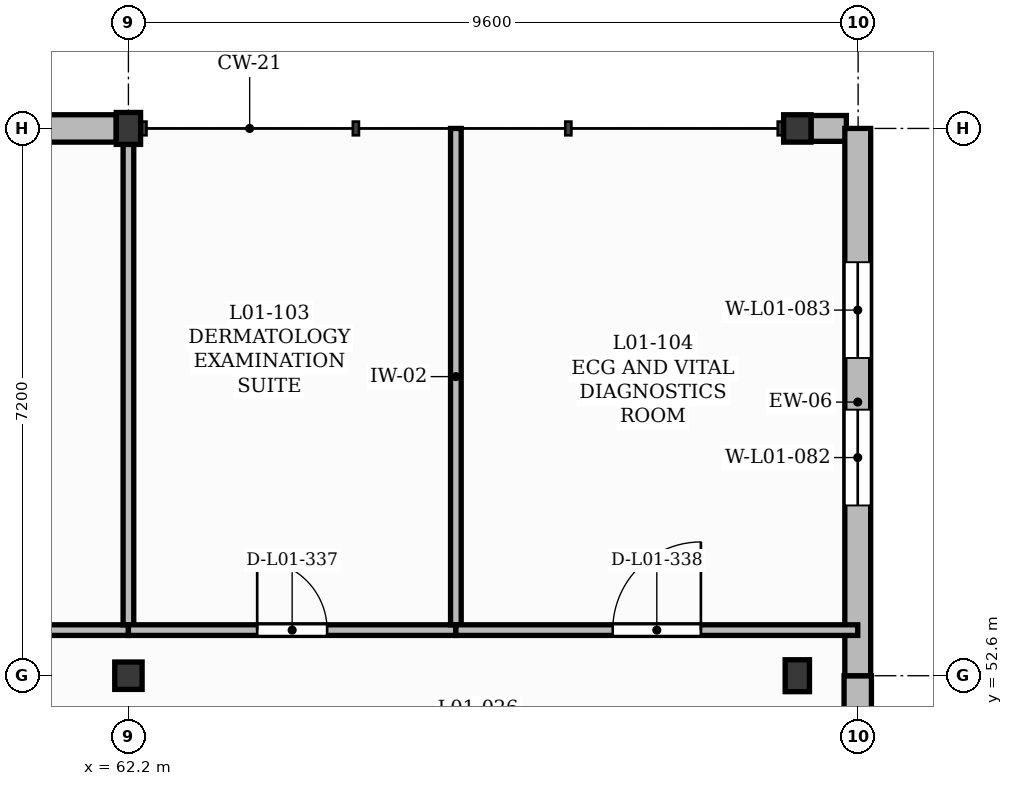
"""IFC4 building model, lengths in metres.
Left out: names, types, materials, properties, quantities, classifications, styles, units other than length and angle.
Written with IfcOpenShell. Run it as: python <this file> out.ifc"""

import sys

from ifc_helpers import new_model, si_unit, direction, frame, frame_2d, origin, origin_2d, place, context, subcontext, project, spatial, rectangle, extrude, element, fill, save


model = new_model("IFC4")
c1 = context("Model", 3, precision=1e-05, world=origin(), true_north=direction((0.0, 1.0)))
c2 = subcontext(c1, "Body", "Model", "MODEL_VIEW")
j1 = project(units=[si_unit("LENGTHUNIT", "METRE"), si_unit("PLANEANGLEUNIT", "RADIAN")], contexts=[c1])
p1 = place(None, origin())
s1 = spatial("IfcSite", under=j1, at=p1, CompositionType="ELEMENT")
p2 = place(p1, origin())
s2 = spatial("IfcBuilding", under=s1, at=p2, CompositionType="ELEMENT")
p3 = place(p2, frame((0.0, 0.0, 4.5)))
s3 = spatial("IfcBuildingStorey", under=s2, at=p3, CompositionType="ELEMENT", Elevation=4.5)
p4 = place(p3, frame((62.2, 52.6, 0.0), z_axis=(0.0, 0.0, 1.0), x_axis=(1.0, 0.0, 0.0)))
e1 = element("IfcColumn", 1, at=p4, inside=s3, PredefinedType="COLUMN", context=c2, shape_type="SweptSolid", body=[
    extrude(rectangle(XDim=0.36, YDim=0.36, at=origin_2d()), origin(), (0.0, 0.0, 1.0), 4.26),
])
for number, where, z_axis, x_axis in (
    (2, (62.2, 59.8, 0.0), (0.0, 0.0, 1.0), (1.0, 0.0, 0.0)),
    (3, (71.0, 52.6, 0.0), (0.0, 0.0, 1.0), (1.0, 0.0, 0.0)),
):
    element("IfcColumn", number, at=place(p3, frame(where, z_axis=z_axis, x_axis=x_axis)), inside=s3, PredefinedType="COLUMN", context=c2, shape_type="SweptSolid", body=[
        extrude(rectangle(XDim=0.32, YDim=0.42, at=origin_2d()), origin(), (0.0, 0.0, 1.0), 4.26),
    ])
p5 = place(p3, frame((71.0, 59.8, 0.0), z_axis=(0.0, 0.0, 1.0), x_axis=(1.0, 0.0, 0.0)))
e4 = element("IfcColumn", 4, at=p5, inside=s3, PredefinedType="COLUMN", context=c2, shape_type="SweptSolid", body=[
    extrude(rectangle(XDim=0.36, YDim=0.36, at=origin_2d()), origin(), (0.0, 0.0, 1.0), 4.26),
])
p6 = place(p3, frame((58.72, 59.8, 0.0), z_axis=(0.0, 0.0, 1.0), x_axis=(1.0, 0.0, 0.0)))
e5 = element("IfcWall", 5, at=p6, inside=s3, PredefinedType="SOLIDWALL", context=c2, shape_type="SweptSolid", body=[
    extrude(rectangle(XDim=3.32, YDim=0.36, at=frame_2d((1.66, 0.0))), origin(), (0.0, 0.0, 1.0), 3.8),
])
p7 = place(p6, frame((1.03, 0.0, 1.05)))
e6 = element("IfcOpeningElement", 6, at=p7, cuts=e5, PredefinedType="OPENING", context=c2, shape_type="SweptSolid", body=[
    extrude(rectangle(XDim=1.26, YDim=1.65, at=frame_2d((0.63, 0.825))), frame((0.0, 0.19, 0.0), z_axis=(0.0, -1.0, 0.0), x_axis=(1.0, 0.0, 0.0)), (0.0, 0.0, 1.0), 0.38),
])
p8 = place(p3, frame((71.795, 45.4, 0.0), z_axis=(0.0, 0.0, 1.0), x_axis=(0.0, 1.0, 0.0)))
e7 = element("IfcWall", 7, at=p8, inside=s3, PredefinedType="SOLIDWALL", context=c2, shape_type="SweptSolid", body=[
    extrude(rectangle(XDim=7.2, YDim=0.36, at=frame_2d((3.6, 0.0))), origin(), (0.0, 0.0, 1.0), 4.26),
])
p9 = place(p8, frame((0.98, 0.0, 1.0)))
e8 = element("IfcOpeningElement", 8, at=p9, cuts=e7, PredefinedType="OPENING", context=c2, shape_type="SweptSolid", body=[
    extrude(rectangle(XDim=1.34, YDim=1.95, at=frame_2d((0.67, 0.975))), frame((0.0, 0.19, 0.0), z_axis=(0.0, -1.0, 0.0), x_axis=(1.0, 0.0, 0.0)), (0.0, 0.0, 1.0), 0.38),
])
p10 = place(p8, frame((3.0, 0.0, 1.0)))
e9 = element("IfcOpeningElement", 9, at=p10, cuts=e7, PredefinedType="OPENING", context=c2, shape_type="SweptSolid", body=[
    extrude(rectangle(XDim=1.34, YDim=1.95, at=frame_2d((0.67, 0.975))), frame((0.0, 0.19, 0.0), z_axis=(0.0, -1.0, 0.0), x_axis=(1.0, 0.0, 0.0)), (0.0, 0.0, 1.0), 0.38),
])
p11 = place(p3, frame((71.18, 59.8, 0.0), z_axis=(0.0, 0.0, 1.0), x_axis=(1.0, 0.0, 0.0)))
e10 = element("IfcWall", 10, at=p11, inside=s3, PredefinedType="SOLIDWALL", context=c2, shape_type="SweptSolid", body=[
    extrude(rectangle(XDim=0.465, YDim=0.34, at=frame_2d((0.232, 0.0))), origin(), (0.0, 0.0, 1.0), 4.26),
])
p12 = place(p3, frame((71.795, 52.6, 0.0), z_axis=(0.0, 0.0, 1.0), x_axis=(0.0, 1.0, 0.0)))
e11 = element("IfcWall", 11, at=p12, inside=s3, PredefinedType="SOLIDWALL", context=c2, shape_type="SweptSolid", body=[
    extrude(rectangle(XDim=7.2, YDim=0.34, at=frame_2d((3.6, 0.0))), origin(), (0.0, 0.0, 1.0), 4.26),
])
p13 = place(p12, frame((2.24, 0.0, 1.05)))
e12 = element("IfcOpeningElement", 12, at=p13, cuts=e11, PredefinedType="OPENING", context=c2, shape_type="SweptSolid", body=[
    extrude(rectangle(XDim=1.26, YDim=1.65, at=frame_2d((0.63, 0.825))), frame((0.0, 0.18, 0.0), z_axis=(0.0, -1.0, 0.0), x_axis=(1.0, 0.0, 0.0)), (0.0, 0.0, 1.0), 0.36),
])
p14 = place(p12, frame((4.18, 0.0, 1.05)))
e13 = element("IfcOpeningElement", 13, at=p14, cuts=e11, PredefinedType="OPENING", context=c2, shape_type="SweptSolid", body=[
    extrude(rectangle(XDim=1.26, YDim=1.65, at=frame_2d((0.63, 0.825))), frame((0.0, 0.18, 0.0), z_axis=(0.0, -1.0, 0.0), x_axis=(1.0, 0.0, 0.0)), (0.0, 0.0, 1.0), 0.36),
])
p15 = place(p3, frame((57.93, 53.2, 0.0), z_axis=(0.0, 0.0, 1.0), x_axis=(1.0, 0.0, 0.0)))
e14 = element("IfcWall", 14, at=p15, inside=s3, PredefinedType="PARTITIONING", context=c2, shape_type="SweptSolid", body=[
    extrude(rectangle(XDim=4.27, YDim=0.14, at=frame_2d((2.135, 0.0))), origin(), (0.0, 0.0, 1.0), 4.18),
])
p16 = place(p15, frame((1.615, 0.0, 0.0)))
e15 = element("IfcOpeningElement", 15, at=p16, cuts=e14, PredefinedType="OPENING", context=c2, shape_type="SweptSolid", body=[
    extrude(rectangle(XDim=1.04, YDim=2.1, at=frame_2d((0.52, 1.05))), frame((0.0, 0.08, 0.0), z_axis=(0.0, -1.0, 0.0), x_axis=(1.0, 0.0, 0.0)), (0.0, 0.0, 1.0), 0.16),
])
p17 = place(p3, frame((62.2, 53.27, 0.0), z_axis=(0.0, 0.0, 1.0), x_axis=(0.0, 1.0, 0.0)))
e16 = element("IfcWall", 16, at=p17, inside=s3, PredefinedType="PARTITIONING", context=c2, shape_type="SweptSolid", body=[
    extrude(rectangle(XDim=6.32, YDim=0.14, at=frame_2d((3.16, 0.0))), origin(), (0.0, 0.0, 1.0), 3.74),
])
p18 = place(p3, frame((62.2, 53.2, 0.0), z_axis=(0.0, 0.0, 1.0), x_axis=(1.0, 0.0, 0.0)))
e17 = element("IfcWall", 17, at=p18, inside=s3, PredefinedType="PARTITIONING", context=c2, shape_type="SweptSolid", body=[
    extrude(rectangle(XDim=4.308, YDim=0.14, at=frame_2d((2.154, 0.0))), origin(), (0.0, 0.0, 1.0), 4.18),
])
p19 = place(p18, frame((1.694, 0.0, 0.0)))
e18 = element("IfcOpeningElement", 18, at=p19, cuts=e17, PredefinedType="OPENING", context=c2, shape_type="SweptSolid", body=[
    extrude(rectangle(XDim=0.92, YDim=2.1, at=frame_2d((0.46, 1.05))), frame((0.0, 0.08, 0.0), z_axis=(0.0, -1.0, 0.0), x_axis=(1.0, 0.0, 0.0)), (0.0, 0.0, 1.0), 0.16),
])
p20 = place(p3, frame((66.508, 53.27, 0.0), z_axis=(0.0, 0.0, 1.0), x_axis=(0.0, 1.0, 0.0)))
e19 = element("IfcWall", 19, at=p20, inside=s3, PredefinedType="PARTITIONING", context=c2, shape_type="SweptSolid", body=[
    extrude(rectangle(XDim=6.53, YDim=0.14, at=frame_2d((3.265, 0.0))), origin(), (0.0, 0.0, 1.0), 3.86),
])
p21 = place(p3, frame((66.508, 53.2, 0.0), z_axis=(0.0, 0.0, 1.0), x_axis=(1.0, 0.0, 0.0)))
e20 = element("IfcWall", 20, at=p21, inside=s3, PredefinedType="PARTITIONING", context=c2, shape_type="SweptSolid", body=[
    extrude(rectangle(XDim=5.287, YDim=0.14, at=frame_2d((2.644, 0.0))), origin(), (0.0, 0.0, 1.0), 4.18),
])
p22 = place(p21, frame((2.063, 0.0, 0.0)))
e21 = element("IfcOpeningElement", 21, at=p22, cuts=e20, PredefinedType="OPENING", context=c2, shape_type="SweptSolid", body=[
    extrude(rectangle(XDim=1.16, YDim=2.1, at=frame_2d((0.58, 1.05))), frame((0.0, 0.08, 0.0), z_axis=(0.0, -1.0, 0.0), x_axis=(1.0, 0.0, 0.0)), (0.0, 0.0, 1.0), 0.16),
])
p23 = place(p13, origin())
e22 = element("IfcWindow", 22, at=p23, inside=s3, PartitioningType="SINGLE_PANEL", PredefinedType="WINDOW", context=c2, shape_type="SweptSolid", body=[
    extrude(rectangle(XDim=1.26, YDim=1.65, at=frame_2d((0.63, 0.825))), frame((0.0, 0.03, 0.0), z_axis=(0.0, -1.0, 0.0), x_axis=(1.0, 0.0, 0.0)), (0.0, 0.0, 1.0), 0.06),
])
fill(e12, e22)
p24 = place(p14, origin())
e23 = element("IfcWindow", 23, at=p24, inside=s3, PartitioningType="SINGLE_PANEL", PredefinedType="WINDOW", context=c2, shape_type="SweptSolid", body=[
    extrude(rectangle(XDim=1.26, YDim=1.65, at=frame_2d((0.63, 0.825))), frame((0.0, 0.03, 0.0), z_axis=(0.0, -1.0, 0.0), x_axis=(1.0, 0.0, 0.0)), (0.0, 0.0, 1.0), 0.06),
])
fill(e13, e23)
p25 = place(p19, origin())
e24 = element("IfcDoor", 24, at=p25, inside=s3, OperationType="SINGLE_SWING_LEFT", PredefinedType="DOOR", context=c2, shape_type="SweptSolid", body=[
    extrude(rectangle(XDim=0.92, YDim=2.1, at=frame_2d((0.46, 1.05))), frame((0.0, 0.025, 0.0), z_axis=(0.0, -1.0, 0.0), x_axis=(1.0, 0.0, 0.0)), (0.0, 0.0, 1.0), 0.05),
])
fill(e18, e24)
p26 = place(p22, origin())
e25 = element("IfcDoor", 25, at=p26, inside=s3, OperationType="SINGLE_SWING_RIGHT", PredefinedType="DOOR", context=c2, shape_type="SweptSolid", body=[
    extrude(rectangle(XDim=1.16, YDim=2.1, at=frame_2d((0.58, 1.05))), frame((0.0, 0.025, 0.0), z_axis=(0.0, -1.0, 0.0), x_axis=(1.0, 0.0, 0.0)), (0.0, 0.0, 1.0), 0.05),
])
fill(e21, e25)
save(model, sys.argv[1])
